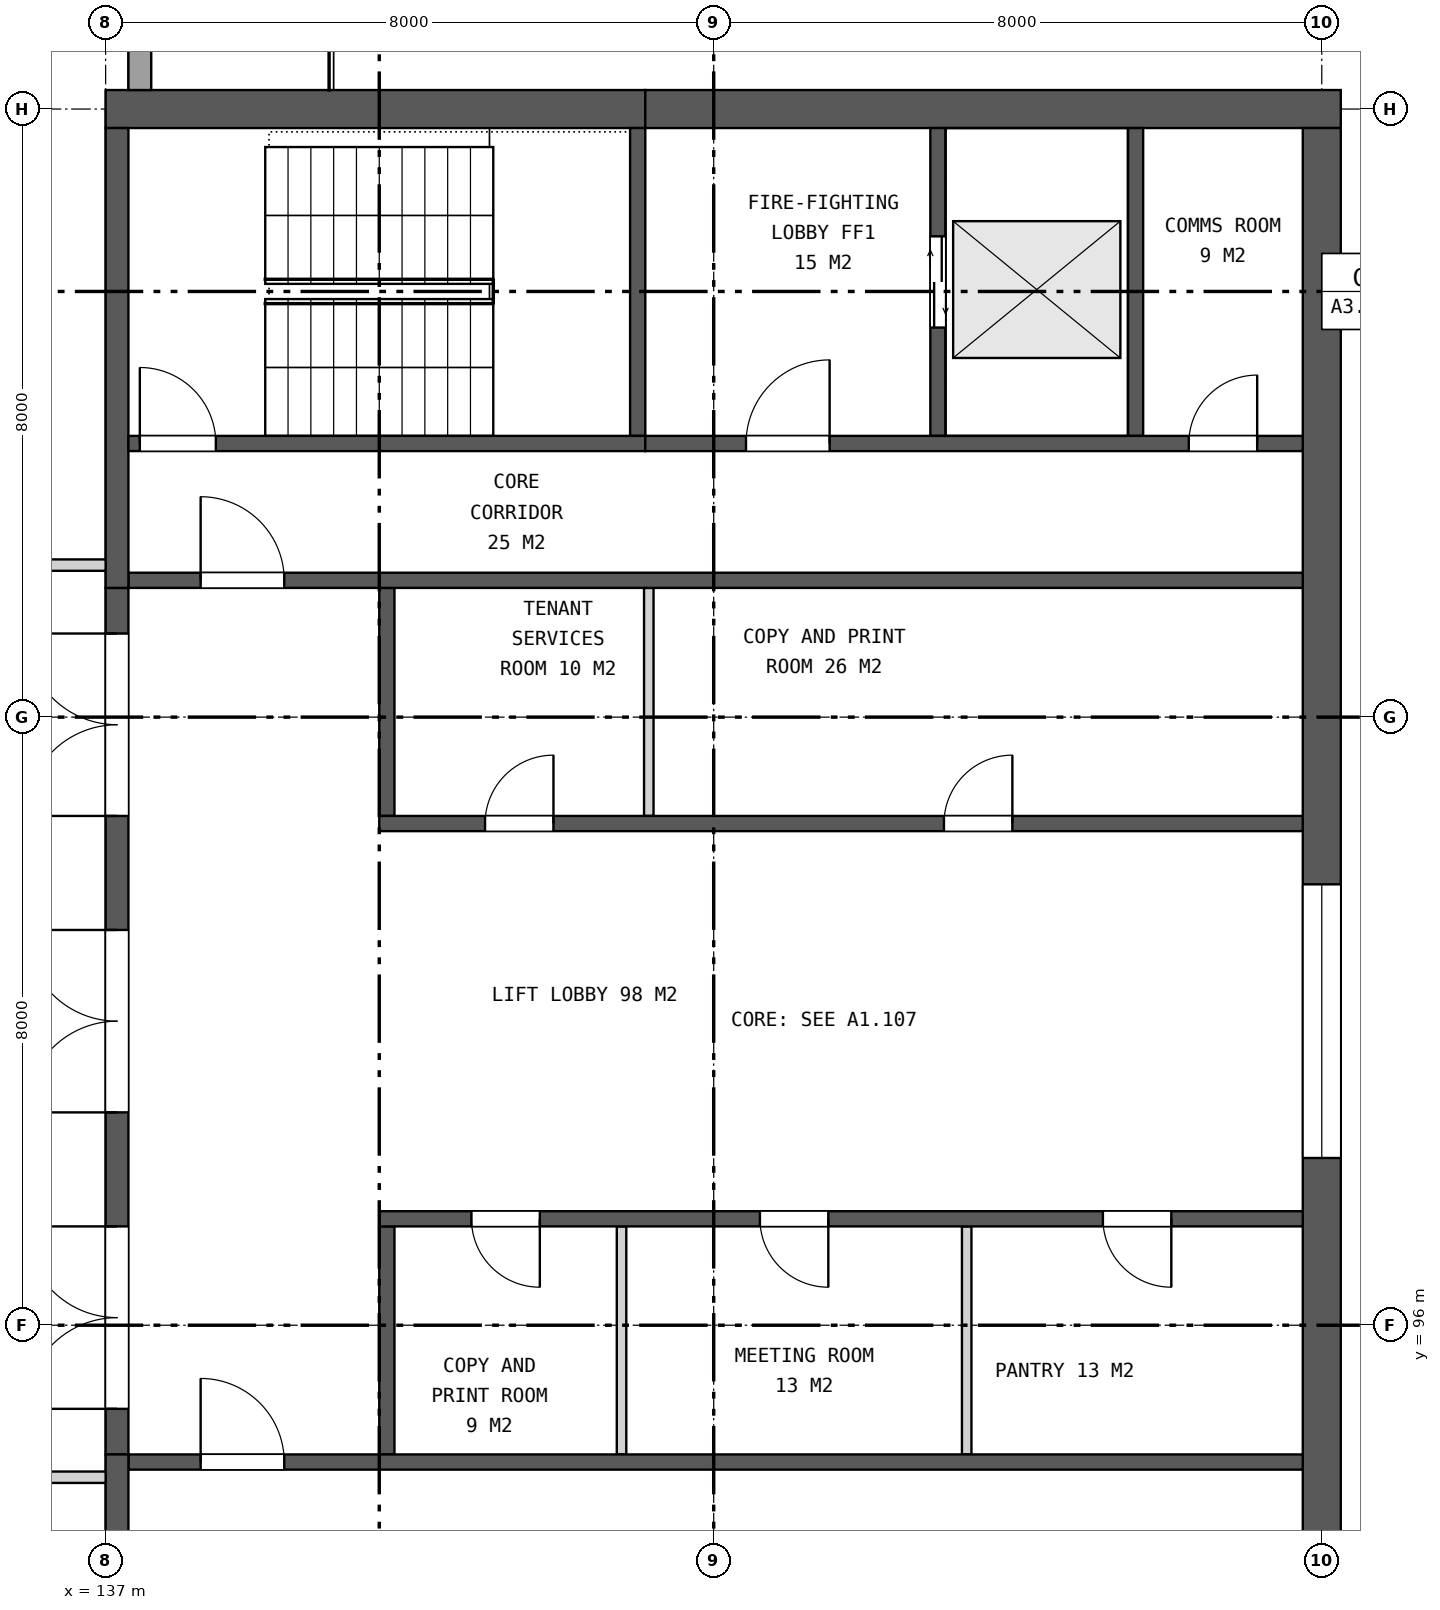
"""IFC4 building model, lengths in metres.
Left out: names, types, materials, properties, quantities, classifications, styles, units other than length and angle.
Written with IfcOpenShell. Run it as: python <this file> out.ifc"""

import sys

from ifc_helpers import new_model, si_unit, direction, frame, frame_2d, origin, place, context, subcontext, project, spatial, rectangle, extrude, element, fill, save


model = new_model("IFC4")
c1 = context("Model", 3, precision=1e-05, world=origin(), true_north=direction((0.0, 1.0)))
c2 = subcontext(c1, "Body", "Model", "MODEL_VIEW")
j1 = project(units=[si_unit("LENGTHUNIT", "METRE"), si_unit("PLANEANGLEUNIT", "RADIAN")], contexts=[c1])
p1 = place(None, origin())
s1 = spatial("IfcSite", under=j1, at=p1, CompositionType="ELEMENT")
p2 = place(p1, origin())
s2 = spatial("IfcBuilding", under=s1, at=p2, CompositionType="ELEMENT")
p3 = place(p2, frame((0.0, 0.0, 311.3)))
s3 = spatial("IfcBuildingStorey", under=s2, at=p3, CompositionType="ELEMENT", Elevation=311.3)
p4 = place(p3, frame((137.0, 112.0, 0.0), z_axis=(0.0, 0.0, 1.0), x_axis=(1.0, 0.0, 0.0)))
e1 = element("IfcWall", 1, at=p4, inside=s3, PredefinedType="SHEAR", context=c2, shape_type="SweptSolid", body=[
    extrude(rectangle(XDim=7.1, YDim=0.5, at=frame_2d((3.55, 0.0))), origin(), (0.0, 0.0, 1.0), 4.2),
])
p5 = place(p3, frame((144.1, 112.0, 0.0), z_axis=(0.0, 0.0, 1.0), x_axis=(1.0, 0.0, 0.0)))
e2 = element("IfcWall", 2, at=p5, inside=s3, PredefinedType="SHEAR", context=c2, shape_type="SweptSolid", body=[
    extrude(rectangle(XDim=9.15, YDim=0.5, at=frame_2d((4.575, 0.0))), origin(), (0.0, 0.0, 1.0), 4.2),
])
p6 = place(p3, frame((153.0, 88.25, 0.0), z_axis=(0.0, 0.0, 1.0), x_axis=(0.0, 1.0, 0.0)))
e3 = element("IfcWall", 3, at=p6, inside=s3, PredefinedType="SHEAR", context=c2, shape_type="SweptSolid", body=[
    extrude(rectangle(XDim=23.5, YDim=0.5, at=frame_2d((11.75, 0.0))), origin(), (0.0, 0.0, 1.0), 4.2),
])
p7 = place(p6, frame((9.95, 0.0, 0.15)))
e4 = element("IfcOpeningElement", 4, at=p7, cuts=e3, PredefinedType="OPENING", context=c2, shape_type="SweptSolid", body=[
    extrude(rectangle(XDim=3.6, YDim=3.0, at=frame_2d((1.8, 1.5))), frame((0.0, 0.26, 0.0), z_axis=(0.0, -1.0, 0.0), x_axis=(1.0, 0.0, 0.0)), (0.0, 0.0, 1.0), 0.52),
])
p8 = place(p3, frame((137.15, 94.3, 0.0), z_axis=(0.0, 0.0, 1.0), x_axis=(0.0, 1.0, 0.0)))
e5 = element("IfcWall", 5, at=p8, inside=s3, PredefinedType="SHEAR", context=c2, shape_type="SweptSolid", body=[
    extrude(rectangle(XDim=11.4, YDim=0.3, at=frame_2d((5.7, 0.0))), origin(), (0.0, 0.0, 1.0), 4.2),
])
p9 = place(p8, frame((0.6, 0.0, 0.0)))
e6 = element("IfcOpeningElement", 6, at=p9, cuts=e5, PredefinedType="OPENING", context=c2, shape_type="SweptSolid", body=[
    extrude(rectangle(XDim=2.4, YDim=2.4, at=frame_2d((1.2, 1.2))), frame((0.0, 0.16, 0.0), z_axis=(0.0, -1.0, 0.0), x_axis=(1.0, 0.0, 0.0)), (0.0, 0.0, 1.0), 0.32),
])
p10 = place(p8, frame((4.5, 0.0, 0.0)))
e7 = element("IfcOpeningElement", 7, at=p10, cuts=e5, PredefinedType="OPENING", context=c2, shape_type="SweptSolid", body=[
    extrude(rectangle(XDim=2.4, YDim=2.4, at=frame_2d((1.2, 1.2))), frame((0.0, 0.16, 0.0), z_axis=(0.0, -1.0, 0.0), x_axis=(1.0, 0.0, 0.0)), (0.0, 0.0, 1.0), 0.32),
])
p11 = place(p8, frame((8.4, 0.0, 0.0)))
e8 = element("IfcOpeningElement", 8, at=p11, cuts=e5, PredefinedType="OPENING", context=c2, shape_type="SweptSolid", body=[
    extrude(rectangle(XDim=2.4, YDim=2.4, at=frame_2d((1.2, 1.2))), frame((0.0, 0.16, 0.0), z_axis=(0.0, -1.0, 0.0), x_axis=(1.0, 0.0, 0.0)), (0.0, 0.0, 1.0), 0.32),
])
p12 = place(p3, frame((140.7, 102.7, 0.0), z_axis=(0.0, 0.0, 1.0), x_axis=(0.0, 1.0, 0.0)))
e9 = element("IfcWall", 9, at=p12, inside=s3, PredefinedType="SHEAR", context=c2, shape_type="SweptSolid", body=[
    extrude(rectangle(XDim=3.0, YDim=0.2, at=frame_2d((1.5, 0.0))), origin(), (0.0, 0.0, 1.0), 4.2),
])
p13 = place(p3, frame((144.146, 102.7, 0.0), z_axis=(0.0, 0.0, 1.0), x_axis=(0.0, 1.0, 0.0)))
e10 = element("IfcWall", 10, at=p13, inside=s3, PredefinedType="PARTITIONING", context=c2, shape_type="SweptSolid", body=[
    extrude(rectangle(XDim=3.0, YDim=0.125, at=frame_2d((1.5, 0.0))), origin(), (0.0, 0.0, 1.0), 4.2),
])
p14 = place(p3, frame((140.6, 102.6, 0.0), z_axis=(0.0, 0.0, 1.0), x_axis=(1.0, 0.0, 0.0)))
e11 = element("IfcWall", 11, at=p14, inside=s3, PredefinedType="SHEAR", context=c2, shape_type="SweptSolid", body=[
    extrude(rectangle(XDim=12.15, YDim=0.2, at=frame_2d((6.075, 0.0))), origin(), (0.0, 0.0, 1.0), 4.2),
])
p15 = place(p14, frame((1.392, 0.0, 0.0)))
e12 = element("IfcOpeningElement", 12, at=p15, cuts=e11, PredefinedType="OPENING", context=c2, shape_type="SweptSolid", body=[
    extrude(rectangle(XDim=0.9, YDim=2.1, at=frame_2d((0.45, 1.05))), frame((0.0, 0.11, 0.0), z_axis=(0.0, -1.0, 0.0), x_axis=(1.0, 0.0, 0.0)), (0.0, 0.0, 1.0), 0.22),
])
p16 = place(p14, frame((7.429, 0.0, 0.0)))
e13 = element("IfcOpeningElement", 13, at=p16, cuts=e11, PredefinedType="OPENING", context=c2, shape_type="SweptSolid", body=[
    extrude(rectangle(XDim=0.9, YDim=2.1, at=frame_2d((0.45, 1.05))), frame((0.0, 0.11, 0.0), z_axis=(0.0, -1.0, 0.0), x_axis=(1.0, 0.0, 0.0)), (0.0, 0.0, 1.0), 0.22),
])
p17 = place(p3, frame((140.7, 94.3, 0.0), z_axis=(0.0, 0.0, 1.0), x_axis=(0.0, 1.0, 0.0)))
e14 = element("IfcWall", 14, at=p17, inside=s3, PredefinedType="SHEAR", context=c2, shape_type="SweptSolid", body=[
    extrude(rectangle(XDim=3.0, YDim=0.2, at=frame_2d((1.5, 0.0))), origin(), (0.0, 0.0, 1.0), 4.2),
])
for number, where, z_axis, x_axis in (
    (15, (143.788, 94.3, 0.0), (0.0, 0.0, 1.0), (0.0, 1.0, 0.0)),
    (16, (148.329, 94.3, 0.0), (0.0, 0.0, 1.0), (0.0, 1.0, 0.0)),
):
    element("IfcWall", number, at=place(p3, frame(where, z_axis=z_axis, x_axis=x_axis)), inside=s3, PredefinedType="PARTITIONING", context=c2, shape_type="SweptSolid", body=[
        extrude(rectangle(XDim=3.0, YDim=0.125, at=frame_2d((1.5, 0.0))), origin(), (0.0, 0.0, 1.0), 4.2),
    ])
p18 = place(p3, frame((140.6, 97.4, 0.0), z_axis=(0.0, 0.0, 1.0), x_axis=(1.0, 0.0, 0.0)))
e17 = element("IfcWall", 17, at=p18, inside=s3, PredefinedType="SHEAR", context=c2, shape_type="SweptSolid", body=[
    extrude(rectangle(XDim=12.15, YDim=0.2, at=frame_2d((6.075, 0.0))), origin(), (0.0, 0.0, 1.0), 4.2),
])
p19 = place(p18, frame((1.212, 0.0, 0.0)))
e18 = element("IfcOpeningElement", 18, at=p19, cuts=e17, PredefinedType="OPENING", context=c2, shape_type="SweptSolid", body=[
    extrude(rectangle(XDim=0.9, YDim=2.1, at=frame_2d((0.45, 1.05))), frame((0.0, 0.11, 0.0), z_axis=(0.0, -1.0, 0.0), x_axis=(1.0, 0.0, 0.0)), (0.0, 0.0, 1.0), 0.22),
])
p20 = place(p18, frame((5.008, 0.0, 0.0)))
e19 = element("IfcOpeningElement", 19, at=p20, cuts=e17, PredefinedType="OPENING", context=c2, shape_type="SweptSolid", body=[
    extrude(rectangle(XDim=0.9, YDim=2.1, at=frame_2d((0.45, 1.05))), frame((0.0, 0.11, 0.0), z_axis=(0.0, -1.0, 0.0), x_axis=(1.0, 0.0, 0.0)), (0.0, 0.0, 1.0), 0.22),
])
p21 = place(p18, frame((9.521, 0.0, 0.0)))
e20 = element("IfcOpeningElement", 20, at=p21, cuts=e17, PredefinedType="OPENING", context=c2, shape_type="SweptSolid", body=[
    extrude(rectangle(XDim=0.9, YDim=2.1, at=frame_2d((0.45, 1.05))), frame((0.0, 0.11, 0.0), z_axis=(0.0, -1.0, 0.0), x_axis=(1.0, 0.0, 0.0)), (0.0, 0.0, 1.0), 0.22),
])
p22 = place(p3, frame((137.3, 105.8, 0.0), z_axis=(0.0, 0.0, 1.0), x_axis=(1.0, 0.0, 0.0)))
e21 = element("IfcWall", 21, at=p22, inside=s3, PredefinedType="SHEAR", context=c2, shape_type="SweptSolid", body=[
    extrude(rectangle(XDim=15.45, YDim=0.2, at=frame_2d((7.725, 0.0))), origin(), (0.0, 0.0, 1.0), 4.2),
])
p23 = place(p22, frame((0.95, 0.0, 0.0)))
e22 = element("IfcOpeningElement", 22, at=p23, cuts=e21, PredefinedType="OPENING", context=c2, shape_type="SweptSolid", body=[
    extrude(rectangle(XDim=1.1, YDim=2.1, at=frame_2d((0.55, 1.05))), frame((0.0, 0.11, 0.0), z_axis=(0.0, -1.0, 0.0), x_axis=(1.0, 0.0, 0.0)), (0.0, 0.0, 1.0), 0.22),
])
p24 = place(p3, frame((137.15, 105.7, 0.0), z_axis=(0.0, 0.0, 1.0), x_axis=(0.0, 1.0, 0.0)))
e23 = element("IfcWall", 23, at=p24, inside=s3, PredefinedType="SHEAR", context=c2, shape_type="SweptSolid", body=[
    extrude(rectangle(XDim=6.05, YDim=0.3, at=frame_2d((3.025, 0.0))), origin(), (0.0, 0.0, 1.0), 4.2),
])
p25 = place(p3, frame((144.0, 107.7, 0.0), z_axis=(0.0, 0.0, 1.0), x_axis=(0.0, 1.0, 0.0)))
e24 = element("IfcWall", 24, at=p25, inside=s3, PredefinedType="SHEAR", context=c2, shape_type="SweptSolid", body=[
    extrude(rectangle(XDim=4.05, YDim=0.2, at=frame_2d((2.025, 0.0))), origin(), (0.0, 0.0, 1.0), 4.2),
])
p26 = place(p3, frame((147.95, 107.7, 0.0), z_axis=(0.0, 0.0, 1.0), x_axis=(0.0, 1.0, 0.0)))
e25 = element("IfcWall", 25, at=p26, inside=s3, PredefinedType="SHEAR", context=c2, shape_type="SweptSolid", body=[
    extrude(rectangle(XDim=4.05, YDim=0.2, at=frame_2d((2.025, 0.0))), origin(), (0.0, 0.0, 1.0), 4.2),
])
p27 = place(p26, frame((1.425, 0.0, 0.0)))
e26 = element("IfcOpeningElement", 26, at=p27, cuts=e25, PredefinedType="OPENING", context=c2, shape_type="SweptSolid", body=[
    extrude(rectangle(XDim=1.2, YDim=2.1, at=frame_2d((0.6, 1.05))), frame((0.0, 0.11, 0.0), z_axis=(0.0, -1.0, 0.0), x_axis=(1.0, 0.0, 0.0)), (0.0, 0.0, 1.0), 0.22),
])
p28 = place(p3, frame((150.55, 107.7, 0.0), z_axis=(0.0, 0.0, 1.0), x_axis=(0.0, 1.0, 0.0)))
e27 = element("IfcWall", 27, at=p28, inside=s3, PredefinedType="SHEAR", context=c2, shape_type="SweptSolid", body=[
    extrude(rectangle(XDim=4.05, YDim=0.2, at=frame_2d((2.025, 0.0))), origin(), (0.0, 0.0, 1.0), 4.2),
])
p29 = place(p3, frame((137.3, 107.6, 0.0), z_axis=(0.0, 0.0, 1.0), x_axis=(1.0, 0.0, 0.0)))
e28 = element("IfcWall", 28, at=p29, inside=s3, PredefinedType="SHEAR", context=c2, shape_type="SweptSolid", body=[
    extrude(rectangle(XDim=6.8, YDim=0.2, at=frame_2d((3.4, 0.0))), origin(), (0.0, 0.0, 1.0), 4.2),
])
p30 = place(p29, frame((0.15, 0.0, 0.0)))
e29 = element("IfcOpeningElement", 29, at=p30, cuts=e28, PredefinedType="OPENING", context=c2, shape_type="SweptSolid", body=[
    extrude(rectangle(XDim=1.0, YDim=2.1, at=frame_2d((0.5, 1.05))), frame((0.0, 0.11, 0.0), z_axis=(0.0, -1.0, 0.0), x_axis=(1.0, 0.0, 0.0)), (0.0, 0.0, 1.0), 0.22),
])
p31 = place(p3, frame((144.1, 107.6, 0.0), z_axis=(0.0, 0.0, 1.0), x_axis=(1.0, 0.0, 0.0)))
e30 = element("IfcWall", 30, at=p31, inside=s3, PredefinedType="SHEAR", context=c2, shape_type="SweptSolid", body=[
    extrude(rectangle(XDim=8.65, YDim=0.2, at=frame_2d((4.325, 0.0))), origin(), (0.0, 0.0, 1.0), 4.2),
])
p32 = place(p31, frame((1.325, 0.0, 0.0)))
e31 = element("IfcOpeningElement", 31, at=p32, cuts=e30, PredefinedType="OPENING", context=c2, shape_type="SweptSolid", body=[
    extrude(rectangle(XDim=1.1, YDim=2.1, at=frame_2d((0.55, 1.05))), frame((0.0, 0.11, 0.0), z_axis=(0.0, -1.0, 0.0), x_axis=(1.0, 0.0, 0.0)), (0.0, 0.0, 1.0), 0.22),
])
p33 = place(p31, frame((7.15, 0.0, 0.0)))
e32 = element("IfcOpeningElement", 32, at=p33, cuts=e30, PredefinedType="OPENING", context=c2, shape_type="SweptSolid", body=[
    extrude(rectangle(XDim=0.9, YDim=2.1, at=frame_2d((0.45, 1.05))), frame((0.0, 0.11, 0.0), z_axis=(0.0, -1.0, 0.0), x_axis=(1.0, 0.0, 0.0)), (0.0, 0.0, 1.0), 0.22),
])
p34 = place(p3, frame((137.3, 94.2, 0.0), z_axis=(0.0, 0.0, 1.0), x_axis=(1.0, 0.0, 0.0)))
e33 = element("IfcWall", 33, at=p34, inside=s3, PredefinedType="SHEAR", context=c2, shape_type="SweptSolid", body=[
    extrude(rectangle(XDim=15.45, YDim=0.2, at=frame_2d((7.725, 0.0))), origin(), (0.0, 0.0, 1.0), 4.2),
])
p35 = place(p34, frame((0.95, 0.0, 0.0)))
e34 = element("IfcOpeningElement", 34, at=p35, cuts=e33, PredefinedType="OPENING", context=c2, shape_type="SweptSolid", body=[
    extrude(rectangle(XDim=1.1, YDim=2.1, at=frame_2d((0.55, 1.05))), frame((0.0, 0.11, 0.0), z_axis=(0.0, -1.0, 0.0), x_axis=(1.0, 0.0, 0.0)), (0.0, 0.0, 1.0), 0.22),
])
p36 = place(p3, frame((137.15, 88.25, 0.0), z_axis=(0.0, 0.0, 1.0), x_axis=(0.0, 1.0, 0.0)))
e35 = element("IfcWall", 35, at=p36, inside=s3, PredefinedType="SHEAR", context=c2, shape_type="SweptSolid", body=[
    extrude(rectangle(XDim=6.05, YDim=0.3, at=frame_2d((3.025, 0.0))), origin(), (0.0, 0.0, 1.0), 4.2),
])
p37 = place(p3, frame((137.45, 112.25, 0.0), z_axis=(0.0, 0.0, 1.0), x_axis=(0.0, 1.0, 0.0)))
e36 = element("IfcWall", 36, at=p37, inside=s3, PredefinedType="SOLIDWALL", context=c2, shape_type="SweptSolid", body=[
    extrude(rectangle(XDim=7.715, YDim=0.3, at=frame_2d((3.857, 0.0))), origin(), (0.0, 0.0, 1.0), 3.544),
])
p38 = place(p37, frame((2.55, 0.0, 0.0)))
e37 = element("IfcOpeningElement", 37, at=p38, cuts=e36, PredefinedType="OPENING", context=c2, shape_type="SweptSolid", body=[
    extrude(rectangle(XDim=2.4, YDim=2.4, at=frame_2d((1.2, 1.2))), frame((0.0, 0.16, 0.0), z_axis=(0.0, -1.0, 0.0), x_axis=(1.0, 0.0, 0.0)), (0.0, 0.0, 1.0), 0.32),
])
for number, where, z_axis, x_axis in (
    (38, (131.475, 94.0, 0.0), (0.0, 0.0, 1.0), (1.0, 0.0, 0.0)),
    (39, (131.475, 106.0, 0.0), (0.0, 0.0, 1.0), (1.0, 0.0, 0.0)),
):
    element("IfcWall", number, at=place(p3, frame(where, z_axis=z_axis, x_axis=x_axis)), inside=s3, PredefinedType="PARTITIONING", context=c2, shape_type="SweptSolid", body=[
        extrude(rectangle(XDim=5.525, YDim=0.15, at=frame_2d((2.762, 0.0))), origin(), (0.0, 0.0, 1.0), 3.443),
    ])
p39 = place(p7, origin())
e40 = element("IfcWindow", 40, at=p39, inside=s3, PartitioningType="SINGLE_PANEL", PredefinedType="WINDOW", context=c2, shape_type="SweptSolid", body=[
    extrude(rectangle(XDim=3.6, YDim=3.0, at=frame_2d((1.8, 1.5))), frame((0.0, 0.03, 0.0), z_axis=(0.0, -1.0, 0.0), x_axis=(1.0, 0.0, 0.0)), (0.0, 0.0, 1.0), 0.06),
])
fill(e4, e40)
p40 = place(p9, origin())
e41 = element("IfcDoor", 41, at=p40, inside=s3, OperationType="DOUBLE_DOOR_SINGLE_SWING", PredefinedType="DOOR", context=c2, shape_type="SweptSolid", body=[
    extrude(rectangle(XDim=2.4, YDim=2.4, at=frame_2d((1.2, 1.2))), frame((0.0, 0.025, 0.0), z_axis=(0.0, -1.0, 0.0), x_axis=(1.0, 0.0, 0.0)), (0.0, 0.0, 1.0), 0.05),
])
fill(e6, e41)
p41 = place(p10, origin())
e42 = element("IfcDoor", 42, at=p41, inside=s3, OperationType="DOUBLE_DOOR_SINGLE_SWING", PredefinedType="DOOR", context=c2, shape_type="SweptSolid", body=[
    extrude(rectangle(XDim=2.4, YDim=2.4, at=frame_2d((1.2, 1.2))), frame((0.0, 0.025, 0.0), z_axis=(0.0, -1.0, 0.0), x_axis=(1.0, 0.0, 0.0)), (0.0, 0.0, 1.0), 0.05),
])
fill(e7, e42)
p42 = place(p11, origin())
e43 = element("IfcDoor", 43, at=p42, inside=s3, OperationType="DOUBLE_DOOR_SINGLE_SWING", PredefinedType="DOOR", context=c2, shape_type="SweptSolid", body=[
    extrude(rectangle(XDim=2.4, YDim=2.4, at=frame_2d((1.2, 1.2))), frame((0.0, 0.025, 0.0), z_axis=(0.0, -1.0, 0.0), x_axis=(1.0, 0.0, 0.0)), (0.0, 0.0, 1.0), 0.05),
])
fill(e8, e43)
p43 = place(p15, origin())
e44 = element("IfcDoor", 44, at=p43, inside=s3, OperationType="SINGLE_SWING_RIGHT", PredefinedType="DOOR", context=c2, shape_type="SweptSolid", body=[
    extrude(rectangle(XDim=0.9, YDim=2.1, at=frame_2d((0.45, 1.05))), frame((0.0, 0.025, 0.0), z_axis=(0.0, -1.0, 0.0), x_axis=(1.0, 0.0, 0.0)), (0.0, 0.0, 1.0), 0.05),
])
fill(e12, e44)
p44 = place(p16, origin())
e45 = element("IfcDoor", 45, at=p44, inside=s3, OperationType="SINGLE_SWING_RIGHT", PredefinedType="DOOR", context=c2, shape_type="SweptSolid", body=[
    extrude(rectangle(XDim=0.9, YDim=2.1, at=frame_2d((0.45, 1.05))), frame((0.0, 0.025, 0.0), z_axis=(0.0, -1.0, 0.0), x_axis=(1.0, 0.0, 0.0)), (0.0, 0.0, 1.0), 0.05),
])
fill(e13, e45)
p45 = place(p19, frame((0.9, 0.0, 0.0), z_axis=(0.0, 0.0, 1.0), x_axis=(-1.0, 0.0, 0.0)))
e46 = element("IfcDoor", 46, at=p45, inside=s3, OperationType="SINGLE_SWING_LEFT", PredefinedType="DOOR", context=c2, shape_type="SweptSolid", body=[
    extrude(rectangle(XDim=0.9, YDim=2.1, at=frame_2d((0.45, 1.05))), frame((0.0, 0.025, 0.0), z_axis=(0.0, -1.0, 0.0), x_axis=(1.0, 0.0, 0.0)), (0.0, 0.0, 1.0), 0.05),
])
fill(e18, e46)
p46 = place(p20, frame((0.9, 0.0, 0.0), z_axis=(0.0, 0.0, 1.0), x_axis=(-1.0, 0.0, 0.0)))
e47 = element("IfcDoor", 47, at=p46, inside=s3, OperationType="SINGLE_SWING_LEFT", PredefinedType="DOOR", context=c2, shape_type="SweptSolid", body=[
    extrude(rectangle(XDim=0.9, YDim=2.1, at=frame_2d((0.45, 1.05))), frame((0.0, 0.025, 0.0), z_axis=(0.0, -1.0, 0.0), x_axis=(1.0, 0.0, 0.0)), (0.0, 0.0, 1.0), 0.05),
])
fill(e19, e47)
p47 = place(p21, frame((0.9, 0.0, 0.0), z_axis=(0.0, 0.0, 1.0), x_axis=(-1.0, 0.0, 0.0)))
e48 = element("IfcDoor", 48, at=p47, inside=s3, OperationType="SINGLE_SWING_LEFT", PredefinedType="DOOR", context=c2, shape_type="SweptSolid", body=[
    extrude(rectangle(XDim=0.9, YDim=2.1, at=frame_2d((0.45, 1.05))), frame((0.0, 0.025, 0.0), z_axis=(0.0, -1.0, 0.0), x_axis=(1.0, 0.0, 0.0)), (0.0, 0.0, 1.0), 0.05),
])
fill(e20, e48)
p48 = place(p23, origin())
e49 = element("IfcDoor", 49, at=p48, inside=s3, OperationType="SINGLE_SWING_LEFT", PredefinedType="DOOR", context=c2, shape_type="SweptSolid", body=[
    extrude(rectangle(XDim=1.1, YDim=2.1, at=frame_2d((0.55, 1.05))), frame((0.0, 0.025, 0.0), z_axis=(0.0, -1.0, 0.0), x_axis=(1.0, 0.0, 0.0)), (0.0, 0.0, 1.0), 0.05),
])
fill(e22, e49)
p49 = place(p27, origin())
e50 = element("IfcDoor", 50, at=p49, inside=s3, OperationType="DOUBLE_DOOR_SLIDING", PredefinedType="DOOR", context=c2, shape_type="SweptSolid", body=[
    extrude(rectangle(XDim=1.2, YDim=2.1, at=frame_2d((0.6, 1.05))), frame((0.0, 0.025, 0.0), z_axis=(0.0, -1.0, 0.0), x_axis=(1.0, 0.0, 0.0)), (0.0, 0.0, 1.0), 0.05),
])
fill(e26, e50)
p50 = place(p30, origin())
e51 = element("IfcDoor", 51, at=p50, inside=s3, OperationType="SINGLE_SWING_LEFT", PredefinedType="DOOR", context=c2, shape_type="SweptSolid", body=[
    extrude(rectangle(XDim=1.0, YDim=2.1, at=frame_2d((0.5, 1.05))), frame((0.0, 0.025, 0.0), z_axis=(0.0, -1.0, 0.0), x_axis=(1.0, 0.0, 0.0)), (0.0, 0.0, 1.0), 0.05),
])
fill(e29, e51)
p51 = place(p32, origin())
e52 = element("IfcDoor", 52, at=p51, inside=s3, OperationType="SINGLE_SWING_RIGHT", PredefinedType="DOOR", context=c2, shape_type="SweptSolid", body=[
    extrude(rectangle(XDim=1.1, YDim=2.1, at=frame_2d((0.55, 1.05))), frame((0.0, 0.025, 0.0), z_axis=(0.0, -1.0, 0.0), x_axis=(1.0, 0.0, 0.0)), (0.0, 0.0, 1.0), 0.05),
])
fill(e31, e52)
p52 = place(p33, origin())
e53 = element("IfcDoor", 53, at=p52, inside=s3, OperationType="SINGLE_SWING_RIGHT", PredefinedType="DOOR", context=c2, shape_type="SweptSolid", body=[
    extrude(rectangle(XDim=0.9, YDim=2.1, at=frame_2d((0.45, 1.05))), frame((0.0, 0.025, 0.0), z_axis=(0.0, -1.0, 0.0), x_axis=(1.0, 0.0, 0.0)), (0.0, 0.0, 1.0), 0.05),
])
fill(e32, e53)
p53 = place(p35, origin())
e54 = element("IfcDoor", 54, at=p53, inside=s3, OperationType="SINGLE_SWING_LEFT", PredefinedType="DOOR", context=c2, shape_type="SweptSolid", body=[
    extrude(rectangle(XDim=1.1, YDim=2.1, at=frame_2d((0.55, 1.05))), frame((0.0, 0.025, 0.0), z_axis=(0.0, -1.0, 0.0), x_axis=(1.0, 0.0, 0.0)), (0.0, 0.0, 1.0), 0.05),
])
fill(e34, e54)
save(model, sys.argv[1])
